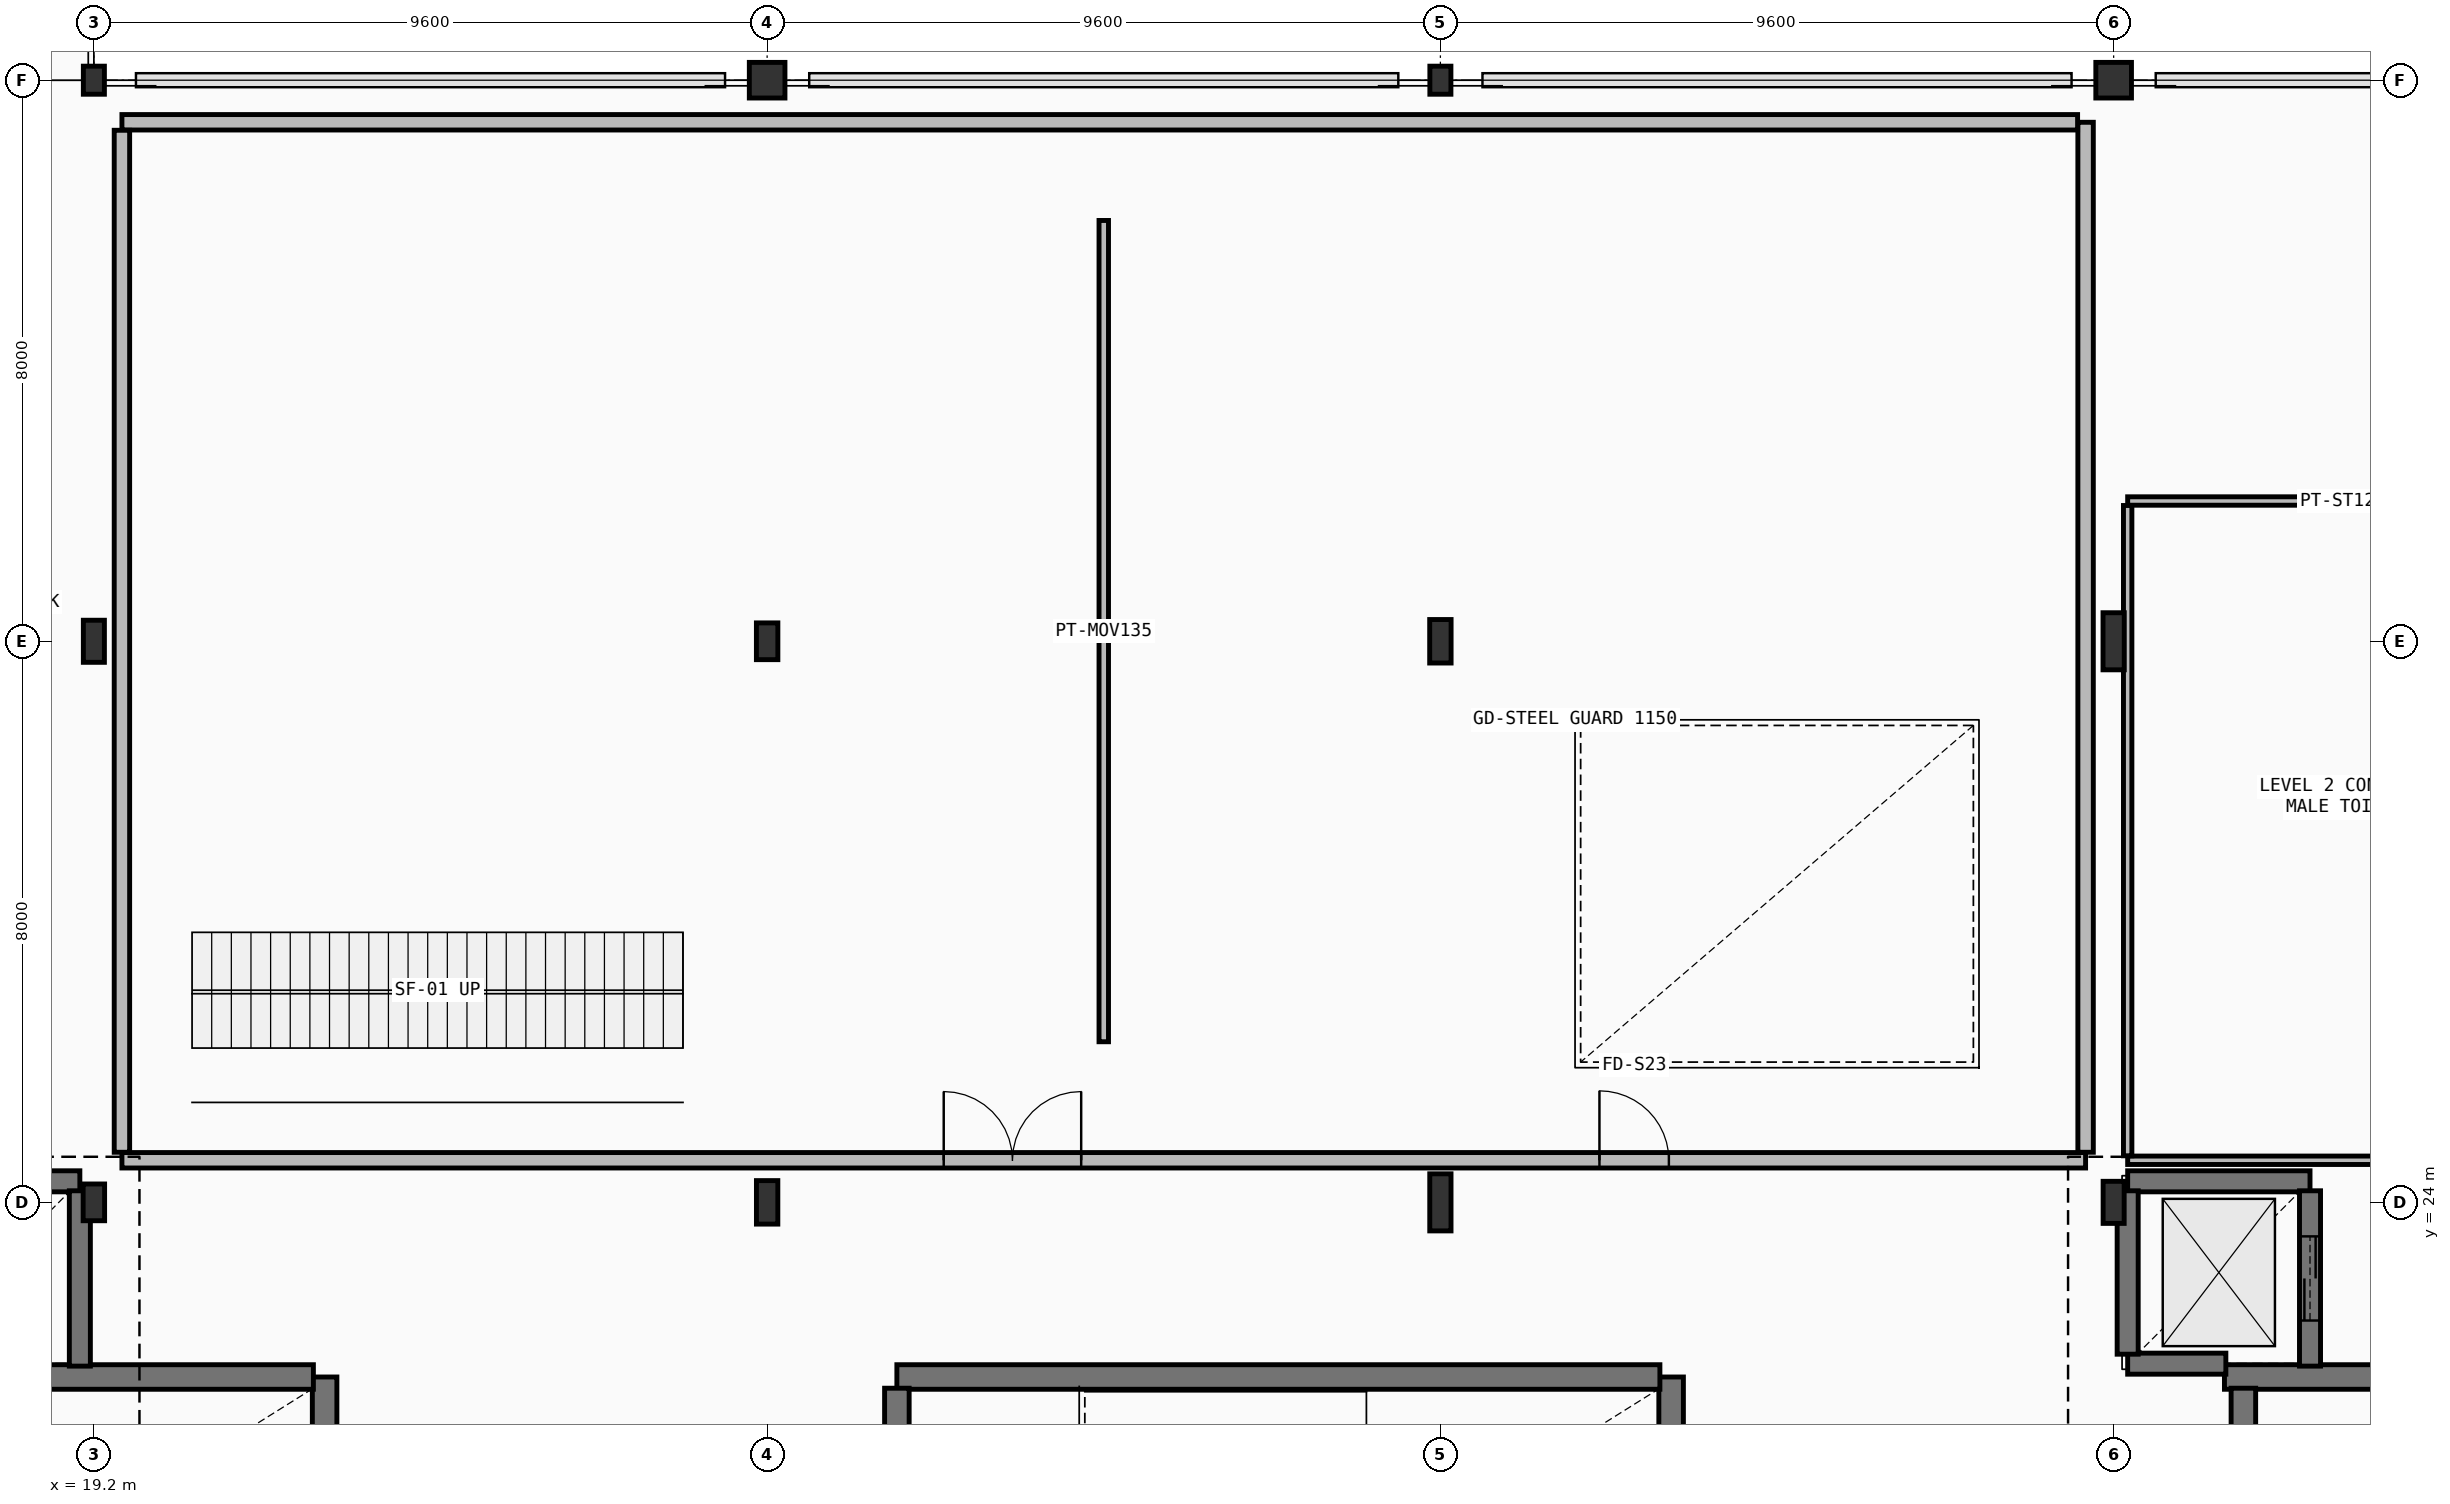
"""IFC4 building model, lengths in metres.
Left out: names, types, materials, properties, quantities, classifications, styles, units other than length and angle.
Written with IfcOpenShell. Run it as: python <this file> out.ifc"""

import sys

from ifc_helpers import new_model, si_unit, direction, frame, frame_2d, origin, origin_2d, place, context, subcontext, project, spatial, rectangle, hollow_circle, i_section, extrude, element, fill, save


model = new_model("IFC4")
c1 = context("Model", 3, precision=1e-05, world=origin(), true_north=direction((0.0, 1.0)))
c2 = subcontext(c1, "Body", "Model", "MODEL_VIEW")
j1 = project(units=[si_unit("LENGTHUNIT", "METRE"), si_unit("PLANEANGLEUNIT", "RADIAN")], contexts=[c1])
p1 = place(None, origin())
s1 = spatial("IfcSite", under=j1, at=p1, CompositionType="ELEMENT")
p2 = place(p1, origin())
s2 = spatial("IfcBuilding", under=s1, at=p2, CompositionType="ELEMENT")
p3 = place(p2, frame((0.0, 0.0, 11.4)))
s3 = spatial("IfcBuildingStorey", under=s2, at=p3, CompositionType="ELEMENT", Elevation=11.4)
p4 = place(p3, frame((19.2, 24.0, 0.0), z_axis=(0.0, 0.0, 1.0), x_axis=(1.0, 0.0, 0.0)))
e1 = element("IfcColumn", 1, at=p4, inside=s3, PredefinedType="COLUMN", context=c2, shape_type="SweptSolid", body=[
    extrude(i_section(OverallWidth=0.306, OverallDepth=0.524, WebThickness=0.021, FlangeThickness=0.04, FilletRadius=0.027, at=origin_2d()), origin(), (0.0, 0.0, 1.0), 4.5),
])
p5 = place(p3, frame((19.2, 32.0, 0.0), z_axis=(0.0, 0.0, 1.0), x_axis=(1.0, 0.0, 0.0)))
e2 = element("IfcColumn", 2, at=p5, inside=s3, PredefinedType="COLUMN", context=c2, shape_type="SweptSolid", body=[
    extrude(i_section(OverallWidth=0.3, OverallDepth=0.6, WebThickness=0.015, FlangeThickness=0.03, FilletRadius=0.027, at=origin_2d()), origin(), (0.0, 0.0, 1.0), 4.5),
])
p6 = place(p3, frame((19.2, 40.0, 0.0), z_axis=(0.0, 0.0, 1.0), x_axis=(1.0, 0.0, 0.0)))
e3 = element("IfcColumn", 3, at=p6, inside=s3, PredefinedType="COLUMN", context=c2, shape_type="SweptSolid", body=[
    extrude(i_section(OverallWidth=0.3, OverallDepth=0.4, WebThickness=0.013, FlangeThickness=0.024, FilletRadius=0.027, at=origin_2d()), origin(), (0.0, 0.0, 1.0), 4.5),
])
p7 = place(p3, frame((28.8, 24.0, 0.0), z_axis=(0.0, 0.0, 1.0), x_axis=(1.0, 0.0, 0.0)))
e4 = element("IfcColumn", 4, at=p7, inside=s3, PredefinedType="COLUMN", context=c2, shape_type="SweptSolid", body=[
    extrude(i_section(OverallWidth=0.305, OverallDepth=0.62, WebThickness=0.021, FlangeThickness=0.04, FilletRadius=0.027, at=origin_2d()), origin(), (0.0, 0.0, 1.0), 4.5),
])
p8 = place(p3, frame((28.8, 32.0, 0.0), z_axis=(0.0, 0.0, 1.0), x_axis=(1.0, 0.0, 0.0)))
e5 = element("IfcColumn", 5, at=p8, inside=s3, PredefinedType="COLUMN", context=c2, shape_type="SweptSolid", body=[
    extrude(i_section(OverallWidth=0.306, OverallDepth=0.524, WebThickness=0.021, FlangeThickness=0.04, FilletRadius=0.027, at=origin_2d()), origin(), (0.0, 0.0, 1.0), 4.5),
])
p9 = place(p3, frame((28.8, 40.0, 0.0), z_axis=(0.0, 0.0, 1.0), x_axis=(1.0, 0.0, 0.0)))
e6 = element("IfcColumn", 6, at=p9, inside=s3, PredefinedType="COLUMN", context=c2, shape_type="SweptSolid", body=[
    extrude(hollow_circle(Radius=0.254, WallThickness=0.025, at=origin_2d()), origin(), (0.0, 0.0, 1.0), 4.5),
])
p10 = place(p3, frame((38.4, 24.0, 0.0), z_axis=(0.0, 0.0, 1.0), x_axis=(1.0, 0.0, 0.0)))
e7 = element("IfcColumn", 7, at=p10, inside=s3, PredefinedType="COLUMN", context=c2, shape_type="SweptSolid", body=[
    extrude(i_section(OverallWidth=0.303, OverallDepth=0.814, WebThickness=0.021, FlangeThickness=0.04, FilletRadius=0.03, at=origin_2d()), origin(), (0.0, 0.0, 1.0), 4.5),
])
p11 = place(p3, frame((38.4, 32.0, 0.0), z_axis=(0.0, 0.0, 1.0), x_axis=(1.0, 0.0, 0.0)))
e8 = element("IfcColumn", 8, at=p11, inside=s3, PredefinedType="COLUMN", context=c2, shape_type="SweptSolid", body=[
    extrude(i_section(OverallWidth=0.305, OverallDepth=0.62, WebThickness=0.021, FlangeThickness=0.04, FilletRadius=0.027, at=origin_2d()), origin(), (0.0, 0.0, 1.0), 4.5),
])
p12 = place(p3, frame((38.4, 40.0, 0.0), z_axis=(0.0, 0.0, 1.0), x_axis=(1.0, 0.0, 0.0)))
e9 = element("IfcColumn", 9, at=p12, inside=s3, PredefinedType="COLUMN", context=c2, shape_type="SweptSolid", body=[
    extrude(i_section(OverallWidth=0.3, OverallDepth=0.4, WebThickness=0.013, FlangeThickness=0.024, FilletRadius=0.027, at=origin_2d()), origin(), (0.0, 0.0, 1.0), 4.5),
])
p13 = place(p3, frame((48.0, 24.0, 0.0), z_axis=(0.0, 0.0, 1.0), x_axis=(1.0, 0.0, 0.0)))
e10 = element("IfcColumn", 10, at=p13, inside=s3, PredefinedType="COLUMN", context=c2, shape_type="SweptSolid", body=[
    extrude(i_section(OverallWidth=0.3, OverallDepth=0.6, WebThickness=0.015, FlangeThickness=0.03, FilletRadius=0.027, at=origin_2d()), origin(), (0.0, 0.0, 1.0), 4.5),
])
p14 = place(p3, frame((48.0, 32.0, 0.0), z_axis=(0.0, 0.0, 1.0), x_axis=(1.0, 0.0, 0.0)))
e11 = element("IfcColumn", 11, at=p14, inside=s3, PredefinedType="COLUMN", context=c2, shape_type="SweptSolid", body=[
    extrude(i_section(OverallWidth=0.303, OverallDepth=0.814, WebThickness=0.021, FlangeThickness=0.04, FilletRadius=0.03, at=origin_2d()), origin(), (0.0, 0.0, 1.0), 4.5),
])
p15 = place(p3, frame((48.0, 40.0, 0.0), z_axis=(0.0, 0.0, 1.0), x_axis=(1.0, 0.0, 0.0)))
e12 = element("IfcColumn", 12, at=p15, inside=s3, PredefinedType="COLUMN", context=c2, shape_type="SweptSolid", body=[
    extrude(hollow_circle(Radius=0.254, WallThickness=0.025, at=origin_2d()), origin(), (0.0, 0.0, 1.0), 4.5),
])
p16 = place(p3, frame((22.49, 16.21, 0.0), z_axis=(0.0, 0.0, 1.0), x_axis=(0.0, 1.0, 0.0)))
e13 = element("IfcWall", 13, at=p16, inside=s3, PredefinedType="SHEAR", context=c2, shape_type="SweptSolid", body=[
    extrude(rectangle(XDim=5.3, YDim=0.35, at=frame_2d((2.65, 0.0))), origin(), (0.0, 0.0, 1.0), 4.27),
])
p17 = place(p3, frame((22.33, 21.51, 0.0), z_axis=(0.0, 0.0, 1.0), x_axis=(-1.0, 0.0, 0.0)))
e14 = element("IfcWall", 14, at=p17, inside=s3, PredefinedType="SHEAR", context=c2, shape_type="SweptSolid", body=[
    extrude(rectangle(XDim=11.15, YDim=0.35, at=frame_2d((5.575, 0.0))), origin(), (0.0, 0.0, 1.0), 4.27),
])
p18 = place(p3, frame((60.73, 21.51, 0.0), z_axis=(0.0, 0.0, 1.0), x_axis=(-1.0, 0.0, 0.0)))
e15 = element("IfcWall", 15, at=p18, inside=s3, PredefinedType="SHEAR", context=c2, shape_type="SweptSolid", body=[
    extrude(rectangle(XDim=11.15, YDim=0.35, at=frame_2d((5.575, 0.0))), origin(), (0.0, 0.0, 1.0), 4.27),
])
p19 = place(p3, frame((49.85, 21.35, 0.0), z_axis=(0.0, 0.0, 1.0), x_axis=(0.0, -1.0, 0.0)))
e16 = element("IfcWall", 16, at=p19, inside=s3, PredefinedType="SHEAR", context=c2, shape_type="SweptSolid", body=[
    extrude(rectangle(XDim=5.14, YDim=0.35, at=frame_2d((2.57, 0.0))), origin(), (0.0, 0.0, 1.0), 4.27),
])
p20 = place(p3, frame((41.69, 16.21, 0.0), z_axis=(0.0, 0.0, 1.0), x_axis=(0.0, 1.0, 0.0)))
e17 = element("IfcWall", 17, at=p20, inside=s3, PredefinedType="SHEAR", context=c2, shape_type="SweptSolid", body=[
    extrude(rectangle(XDim=5.3, YDim=0.35, at=frame_2d((2.65, 0.0))), origin(), (0.0, 0.0, 1.0), 4.27),
])
p21 = place(p3, frame((41.53, 21.51, 0.0), z_axis=(0.0, 0.0, 1.0), x_axis=(-1.0, 0.0, 0.0)))
e18 = element("IfcWall", 18, at=p21, inside=s3, PredefinedType="SHEAR", context=c2, shape_type="SweptSolid", body=[
    extrude(rectangle(XDim=10.88, YDim=0.35, at=frame_2d((5.44, 0.0))), origin(), (0.0, 0.0, 1.0), 4.27),
])
p22 = place(p3, frame((30.65, 21.35, 0.0), z_axis=(0.0, 0.0, 1.0), x_axis=(0.0, -1.0, 0.0)))
e19 = element("IfcWall", 19, at=p22, inside=s3, PredefinedType="SHEAR", context=c2, shape_type="SweptSolid", body=[
    extrude(rectangle(XDim=5.14, YDim=0.35, at=frame_2d((2.57, 0.0))), origin(), (0.0, 0.0, 1.0), 4.27),
])
p23 = place(p3, frame((19.0, 24.3, 0.0), z_axis=(0.0, 0.0, 1.0), x_axis=(-1.0, 0.0, 0.0)))
e20 = element("IfcWall", 20, at=p23, inside=s3, PredefinedType="SHEAR", context=c2, shape_type="SweptSolid", body=[
    extrude(rectangle(XDim=2.6, YDim=0.3, at=frame_2d((1.3, 0.0))), origin(), (0.0, 0.0, 1.0), 4.27),
])
p24 = place(p3, frame((19.0, 21.665, 0.0), z_axis=(0.0, 0.0, 1.0), x_axis=(0.0, 1.0, 0.0)))
e21 = element("IfcWall", 21, at=p24, inside=s3, PredefinedType="SHEAR", context=c2, shape_type="SweptSolid", body=[
    extrude(rectangle(XDim=2.5, YDim=0.3, at=frame_2d((1.25, 0.0))), origin(), (0.0, 0.0, 1.0), 4.27),
])
p25 = place(p3, frame((50.8, 24.3, 0.0), z_axis=(0.0, 0.0, 1.0), x_axis=(-1.0, 0.0, 0.0)))
e22 = element("IfcWall", 22, at=p25, inside=s3, PredefinedType="SHEAR", context=c2, shape_type="SweptSolid", body=[
    extrude(rectangle(XDim=2.6, YDim=0.3, at=frame_2d((1.3, 0.0))), origin(), (0.0, 0.0, 1.0), 4.27),
])
p26 = place(p3, frame((48.2, 21.7, 0.0), z_axis=(0.0, 0.0, 1.0), x_axis=(1.0, 0.0, 0.0)))
e23 = element("IfcWall", 23, at=p26, inside=s3, PredefinedType="SHEAR", context=c2, shape_type="SweptSolid", body=[
    extrude(rectangle(XDim=1.4, YDim=0.3, at=frame_2d((0.7, 0.0))), origin(), (0.0, 0.0, 1.0), 4.27),
])
p27 = place(p3, frame((50.8, 21.665, 0.0), z_axis=(0.0, 0.0, 1.0), x_axis=(0.0, 1.0, 0.0)))
e24 = element("IfcWall", 24, at=p27, inside=s3, PredefinedType="SHEAR", context=c2, shape_type="SweptSolid", body=[
    extrude(rectangle(XDim=2.5, YDim=0.3, at=frame_2d((1.25, 0.0))), origin(), (0.0, 0.0, 1.0), 4.27),
])
p28 = place(p27, frame((0.65, 0.0, 0.0)))
e25 = element("IfcOpeningElement", 25, at=p28, cuts=e24, PredefinedType="OPENING", context=c2, shape_type="SweptSolid", body=[
    extrude(rectangle(XDim=1.2, YDim=2.2, at=frame_2d((0.6, 1.1))), frame((0.0, 0.16, 0.0), z_axis=(0.0, -1.0, 0.0), x_axis=(1.0, 0.0, 0.0)), (0.0, 0.0, 1.0), 0.32),
])
p29 = place(p3, frame((48.2, 24.165, 0.0), z_axis=(0.0, 0.0, 1.0), x_axis=(0.0, -1.0, 0.0)))
e26 = element("IfcWall", 26, at=p29, inside=s3, PredefinedType="SHEAR", context=c2, shape_type="SweptSolid", body=[
    extrude(rectangle(XDim=2.33, YDim=0.3, at=frame_2d((1.165, 0.0))), origin(), (0.0, 0.0, 1.0), 4.27),
])
p30 = place(p3, frame((19.6, 24.6, 0.0), z_axis=(0.0, 0.0, 1.0), x_axis=(1.0, 0.0, 0.0)))
e27 = element("IfcWall", 27, at=p30, inside=s3, PredefinedType="PARTITIONING", context=c2, shape_type="SweptSolid", body=[
    extrude(rectangle(XDim=28.0, YDim=0.22, at=frame_2d((14.0, 0.0))), origin(), (0.0, 0.0, 1.0), 3.64),
])
p31 = place(p30, frame((11.718, 0.0, 0.0)))
e28 = element("IfcOpeningElement", 28, at=p31, cuts=e27, PredefinedType="OPENING", context=c2, shape_type="SweptSolid", body=[
    extrude(rectangle(XDim=1.96, YDim=2.36, at=frame_2d((0.98, 1.18))), frame((0.0, 0.12, 0.0), z_axis=(0.0, -1.0, 0.0), x_axis=(1.0, 0.0, 0.0)), (0.0, 0.0, 1.0), 0.24),
])
p32 = place(p30, frame((21.068, 0.0, 0.0)))
e29 = element("IfcOpeningElement", 29, at=p32, cuts=e27, PredefinedType="OPENING", context=c2, shape_type="SweptSolid", body=[
    extrude(rectangle(XDim=0.99, YDim=2.28, at=frame_2d((0.495, 1.14))), frame((0.0, 0.12, 0.0), z_axis=(0.0, -1.0, 0.0), x_axis=(1.0, 0.0, 0.0)), (0.0, 0.0, 1.0), 0.24),
])
p33 = place(p3, frame((47.6, 24.714, 0.0), z_axis=(0.0, 0.0, 1.0), x_axis=(0.0, 1.0, 0.0)))
e30 = element("IfcWall", 30, at=p33, inside=s3, PredefinedType="PARTITIONING", context=c2, shape_type="SweptSolid", body=[
    extrude(rectangle(XDim=14.686, YDim=0.22, at=frame_2d((7.343, 0.0))), origin(), (0.0, 0.0, 1.0), 3.44),
])
p34 = place(p3, frame((47.486, 39.4, 0.0), z_axis=(0.0, 0.0, 1.0), x_axis=(-1.0, 0.0, 0.0)))
e31 = element("IfcWall", 31, at=p34, inside=s3, PredefinedType="PARTITIONING", context=c2, shape_type="SweptSolid", body=[
    extrude(rectangle(XDim=27.886, YDim=0.22, at=frame_2d((13.943, 0.0))), origin(), (0.0, 0.0, 1.0), 3.34),
])
p35 = place(p3, frame((19.6, 39.286, 0.0), z_axis=(0.0, 0.0, 1.0), x_axis=(0.0, -1.0, 0.0)))
e32 = element("IfcWall", 32, at=p35, inside=s3, PredefinedType="PARTITIONING", context=c2, shape_type="SweptSolid", body=[
    extrude(rectangle(XDim=14.572, YDim=0.22, at=frame_2d((7.286, 0.0))), origin(), (0.0, 0.0, 1.0), 3.69),
])
p36 = place(p3, frame((33.6, 26.29, 0.0), z_axis=(0.0, 0.0, 1.0), x_axis=(0.0, 1.0, 0.0)))
e33 = element("IfcWall", 33, at=p36, inside=s3, PredefinedType="MOVABLE", context=c2, shape_type="SweptSolid", body=[
    extrude(rectangle(XDim=11.71, YDim=0.135, at=frame_2d((5.855, 0.0))), origin(), (0.0, 0.0, 1.0), 3.74),
])
p37 = place(p3, frame((48.2, 24.6, 0.0), z_axis=(0.0, 0.0, 1.0), x_axis=(1.0, 0.0, 0.0)))
e34 = element("IfcWall", 34, at=p37, inside=s3, PredefinedType="PARTITIONING", context=c2, shape_type="SweptSolid", body=[
    extrude(rectangle(XDim=6.2, YDim=0.12, at=frame_2d((3.1, 0.0))), origin(), (0.0, 0.0, 1.0), 4.27),
])
p38 = place(p37, frame((4.064, 0.0, 0.0)))
e35 = element("IfcOpeningElement", 35, at=p38, cuts=e34, PredefinedType="OPENING", context=c2, shape_type="SweptSolid", body=[
    extrude(rectangle(XDim=1.12, YDim=2.2, at=frame_2d((0.56, 1.1))), frame((0.0, 0.07, 0.0), z_axis=(0.0, -1.0, 0.0), x_axis=(1.0, 0.0, 0.0)), (0.0, 0.0, 1.0), 0.14),
])
p39 = place(p3, frame((54.336, 34.0, 0.0), z_axis=(0.0, 0.0, 1.0), x_axis=(-1.0, 0.0, 0.0)))
e36 = element("IfcWall", 36, at=p39, inside=s3, PredefinedType="PARTITIONING", context=c2, shape_type="SweptSolid", body=[
    extrude(rectangle(XDim=6.136, YDim=0.12, at=frame_2d((3.068, 0.0))), origin(), (0.0, 0.0, 1.0), 4.27),
])
p40 = place(p3, frame((48.2, 33.936, 0.0), z_axis=(0.0, 0.0, 1.0), x_axis=(0.0, -1.0, 0.0)))
e37 = element("IfcWall", 37, at=p40, inside=s3, PredefinedType="PARTITIONING", context=c2, shape_type="SweptSolid", body=[
    extrude(rectangle(XDim=9.272, YDim=0.12, at=frame_2d((4.636, 0.0))), origin(), (0.0, 0.0, 1.0), 3.34),
])
p41 = place(p28, origin())
e38 = element("IfcDoor", 38, at=p41, inside=s3, OperationType="DOUBLE_DOOR_SLIDING", PredefinedType="DOOR", context=c2, shape_type="SweptSolid", body=[
    extrude(rectangle(XDim=1.2, YDim=2.2, at=frame_2d((0.6, 1.1))), frame((0.0, 0.025, 0.0), z_axis=(0.0, -1.0, 0.0), x_axis=(1.0, 0.0, 0.0)), (0.0, 0.0, 1.0), 0.05),
])
fill(e25, e38)
p42 = place(p31, origin())
e39 = element("IfcDoor", 39, at=p42, inside=s3, OperationType="DOUBLE_DOOR_SINGLE_SWING", PredefinedType="DOOR", context=c2, shape_type="SweptSolid", body=[
    extrude(rectangle(XDim=1.96, YDim=2.36, at=frame_2d((0.98, 1.18))), frame((0.0, 0.025, 0.0), z_axis=(0.0, -1.0, 0.0), x_axis=(1.0, 0.0, 0.0)), (0.0, 0.0, 1.0), 0.05),
])
fill(e28, e39)
p43 = place(p32, origin())
e40 = element("IfcDoor", 40, at=p43, inside=s3, OperationType="SINGLE_SWING_LEFT", PredefinedType="DOOR", context=c2, shape_type="SweptSolid", body=[
    extrude(rectangle(XDim=0.99, YDim=2.28, at=frame_2d((0.495, 1.14))), frame((0.0, 0.025, 0.0), z_axis=(0.0, -1.0, 0.0), x_axis=(1.0, 0.0, 0.0)), (0.0, 0.0, 1.0), 0.05),
])
fill(e29, e40)
save(model, sys.argv[1])
